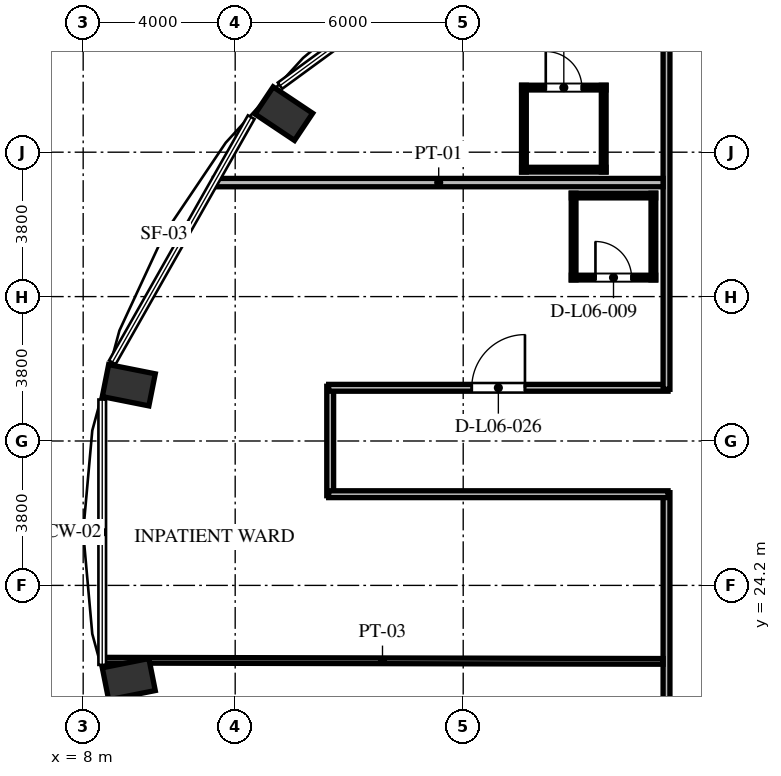
"""IFC4 building model, lengths in metres.
Left out: names, types, materials, properties, quantities, classifications, styles, units other than length and angle.
Written with IfcOpenShell. Run it as: python <this file> out.ifc"""

import sys

from ifc_helpers import new_model, si_unit, direction, frame, frame_2d, origin, origin_2d, place, context, subcontext, project, spatial, rectangle, extrude, element, fill, save


model = new_model("IFC4")
c1 = context("Model", 3, precision=1e-05, world=origin(), true_north=direction((0.0, 1.0)))
c2 = subcontext(c1, "Body", "Model", "MODEL_VIEW")
j1 = project(units=[si_unit("LENGTHUNIT", "METRE"), si_unit("PLANEANGLEUNIT", "RADIAN")], contexts=[c1])
p1 = place(None, origin())
s1 = spatial("IfcSite", under=j1, at=p1, CompositionType="ELEMENT")
p2 = place(p1, origin())
s2 = spatial("IfcBuilding", under=s1, at=p2, CompositionType="ELEMENT")
p3 = place(p2, frame((0.0, 0.0, 28.848)))
s3 = spatial("IfcBuildingStorey", under=s2, at=p3, CompositionType="ELEMENT", Elevation=28.848)
for number, where, z_axis, x_axis in (
    (1, (13.28, 36.614, 0.0), (0.0, 0.0, 1.0), (-0.831, 0.556, 0.0)),
    (2, (9.2, 29.468, 0.0), (0.0, 0.0, 1.0), (-0.981, 0.195, 0.0)),
    (3, (9.2, 21.732, 0.0), (0.0, 0.0, 1.0), (-0.981, -0.195, 0.0)),
):
    element("IfcColumn", number, at=place(p3, frame(where, z_axis=z_axis, x_axis=x_axis)), inside=s3, PredefinedType="COLUMN", context=c2, shape_type="SweptSolid", body=[
        extrude(rectangle(XDim=1.25, YDim=0.86, at=origin_2d()), origin(), (0.0, 0.0, 1.0), 3.648),
    ])
p4 = place(p3, frame((14.5, 26.56, 0.0), z_axis=(0.0, 0.0, 1.0), x_axis=(0.0, 1.0, 0.0)))
e4 = element("IfcWall", 4, at=p4, inside=s3, PredefinedType="PARTITIONING", context=c2, shape_type="SweptSolid", body=[
    extrude(rectangle(XDim=2.88, YDim=0.18, at=frame_2d((1.44, 0.0))), origin(), (0.0, 0.0, 1.0), 3.428),
])
p5 = place(p3, frame((14.46, 29.4, 0.0), z_axis=(0.0, 0.0, 1.0), x_axis=(1.0, 0.0, 0.0)))
e5 = element("IfcWall", 5, at=p5, inside=s3, PredefinedType="PARTITIONING", context=c2, shape_type="SweptSolid", body=[
    extrude(rectangle(XDim=8.93, YDim=0.18, at=frame_2d((4.465, 0.0))), origin(), (0.0, 0.0, 1.0), 3.428),
])
p6 = place(p5, frame((3.765, 0.0, 0.0)))
e6 = element("IfcOpeningElement", 6, at=p6, cuts=e5, PredefinedType="OPENING", context=c2, shape_type="SweptSolid", body=[
    extrude(rectangle(XDim=1.4, YDim=2.2, at=frame_2d((0.7, 1.1))), frame((0.0, 0.1, 0.0), z_axis=(0.0, -1.0, 0.0), x_axis=(1.0, 0.0, 0.0)), (0.0, 0.0, 1.0), 0.2),
])
p7 = place(p3, frame((23.35, 29.36, 0.0), z_axis=(0.0, 0.0, 1.0), x_axis=(0.0, 1.0, 0.0)))
e7 = element("IfcWall", 7, at=p7, inside=s3, PredefinedType="PARTITIONING", context=c2, shape_type="SweptSolid", body=[
    extrude(rectangle(XDim=9.43, YDim=0.18, at=frame_2d((4.715, 0.0))), origin(), (0.0, 0.0, 1.0), 3.428),
])
p8 = place(p3, frame((23.35, 17.36, 0.0), z_axis=(0.0, 0.0, 1.0), x_axis=(0.0, 1.0, 0.0)))
e8 = element("IfcWall", 8, at=p8, inside=s3, PredefinedType="PARTITIONING", context=c2, shape_type="SweptSolid", body=[
    extrude(rectangle(XDim=9.28, YDim=0.18, at=frame_2d((4.64, 0.0))), origin(), (0.0, 0.0, 1.0), 3.428),
])
p9 = place(p3, frame((23.39, 26.6, 0.0), z_axis=(0.0, 0.0, 1.0), x_axis=(-1.0, 0.0, 0.0)))
e9 = element("IfcWall", 9, at=p9, inside=s3, PredefinedType="PARTITIONING", context=c2, shape_type="SweptSolid", body=[
    extrude(rectangle(XDim=8.93, YDim=0.18, at=frame_2d((4.465, 0.0))), origin(), (0.0, 0.0, 1.0), 3.428),
])
p10 = place(p3, frame((8.493, 22.231, 0.0), z_axis=(0.0, 0.0, 1.0), x_axis=(0.999997760873, -0.002116187438, 0.0)))
e10 = element("IfcWall", 10, at=p10, inside=s3, PredefinedType="PARTITIONING", context=c2, shape_type="SweptSolid", body=[
    extrude(rectangle(XDim=14.767, YDim=0.15, at=frame_2d((7.384, 0.0))), origin(), (0.0, 0.0, 1.0), 3.428),
])
p11 = place(p3, frame((11.451, 34.8, 0.0), z_axis=(0.0, 0.0, 1.0), x_axis=(1.0, 0.0, 0.0)))
e11 = element("IfcWall", 11, at=p11, inside=s3, PredefinedType="PARTITIONING", context=c2, shape_type="SweptSolid", body=[
    extrude(rectangle(XDim=11.809, YDim=0.22, at=frame_2d((5.905, 0.0))), origin(), (0.0, 0.0, 1.0), 3.428),
])
p12 = place(p3, frame((19.538, 37.3, 0.0), z_axis=(0.0, 0.0, 1.0), x_axis=(1.0, 0.0, 0.0)))
e12 = element("IfcWall", 12, at=p12, inside=s3, PredefinedType="PARTITIONING", context=c2, shape_type="SweptSolid", body=[
    extrude(rectangle(XDim=2.22, YDim=0.125, at=frame_2d((1.11, 0.0))), origin(), (0.0, 0.0, 1.0), 3.428),
])
p13 = place(p12, frame((0.635, 0.0, 0.0)))
e13 = element("IfcOpeningElement", 13, at=p13, cuts=e12, PredefinedType="OPENING", context=c2, shape_type="SweptSolid", body=[
    extrude(rectangle(XDim=0.95, YDim=2.1, at=frame_2d((0.475, 1.05))), frame((0.0, 0.073, 0.0), z_axis=(0.0, -1.0, 0.0), x_axis=(1.0, 0.0, 0.0)), (0.0, 0.0, 1.0), 0.145),
])
p14 = place(p3, frame((19.538, 35.14, 0.0), z_axis=(0.0, 0.0, 1.0), x_axis=(1.0, 0.0, 0.0)))
e14 = element("IfcWall", 14, at=p14, inside=s3, PredefinedType="PARTITIONING", context=c2, shape_type="SweptSolid", body=[
    extrude(rectangle(XDim=2.22, YDim=0.125, at=frame_2d((1.11, 0.0))), origin(), (0.0, 0.0, 1.0), 3.428),
])
for number, where, z_axis, x_axis in (
    (15, (21.698, 35.08, 0.0), (0.0, 0.0, 1.0), (0.0, 1.0, 0.0)),
    (16, (19.597, 35.08, 0.0), (0.0, 0.0, 1.0), (0.0, 1.0, 0.0)),
):
    element("IfcWall", number, at=place(p3, frame(where, z_axis=z_axis, x_axis=x_axis)), inside=s3, PredefinedType="PARTITIONING", context=c2, shape_type="SweptSolid", body=[
        extrude(rectangle(XDim=2.28, YDim=0.125, at=frame_2d((1.14, 0.0))), origin(), (0.0, 0.0, 1.0), 3.428),
    ])
p15 = place(p3, frame((20.845, 34.46, 0.0), z_axis=(0.0, 0.0, 1.0), x_axis=(1.0, 0.0, 0.0)))
e17 = element("IfcWall", 17, at=p15, inside=s3, PredefinedType="PARTITIONING", context=c2, shape_type="SweptSolid", body=[
    extrude(rectangle(XDim=2.22, YDim=0.125, at=frame_2d((1.11, 0.0))), origin(), (0.0, 0.0, 1.0), 3.428),
])
p16 = place(p3, frame((20.845, 32.3, 0.0), z_axis=(0.0, 0.0, 1.0), x_axis=(1.0, 0.0, 0.0)))
e18 = element("IfcWall", 18, at=p16, inside=s3, PredefinedType="PARTITIONING", context=c2, shape_type="SweptSolid", body=[
    extrude(rectangle(XDim=2.22, YDim=0.125, at=frame_2d((1.11, 0.0))), origin(), (0.0, 0.0, 1.0), 3.428),
])
p17 = place(p16, frame((0.635, 0.0, 0.0)))
e19 = element("IfcOpeningElement", 19, at=p17, cuts=e18, PredefinedType="OPENING", context=c2, shape_type="SweptSolid", body=[
    extrude(rectangle(XDim=0.95, YDim=2.1, at=frame_2d((0.475, 1.05))), frame((0.0, 0.073, 0.0), z_axis=(0.0, -1.0, 0.0), x_axis=(1.0, 0.0, 0.0)), (0.0, 0.0, 1.0), 0.145),
])
for number, where, z_axis, x_axis in (
    (20, (23.005, 32.24, 0.0), (0.0, 0.0, 1.0), (0.0, 1.0, 0.0)),
    (21, (20.905, 32.24, 0.0), (0.0, 0.0, 1.0), (0.0, 1.0, 0.0)),
):
    element("IfcWall", number, at=place(p3, frame(where, z_axis=z_axis, x_axis=x_axis)), inside=s3, PredefinedType="PARTITIONING", context=c2, shape_type="SweptSolid", body=[
        extrude(rectangle(XDim=2.28, YDim=0.125, at=frame_2d((1.14, 0.0))), origin(), (0.0, 0.0, 1.0), 3.428),
    ])
p18 = place(p13, origin())
e22 = element("IfcDoor", 22, at=p18, inside=s3, OperationType="SINGLE_SWING_LEFT", PredefinedType="DOOR", context=c2, shape_type="SweptSolid", body=[
    extrude(rectangle(XDim=0.95, YDim=2.1, at=frame_2d((0.475, 1.05))), frame((0.0, 0.025, 0.0), z_axis=(0.0, -1.0, 0.0), x_axis=(1.0, 0.0, 0.0)), (0.0, 0.0, 1.0), 0.05),
])
fill(e13, e22)
p19 = place(p17, origin())
e23 = element("IfcDoor", 23, at=p19, inside=s3, OperationType="SINGLE_SWING_LEFT", PredefinedType="DOOR", context=c2, shape_type="SweptSolid", body=[
    extrude(rectangle(XDim=0.95, YDim=2.1, at=frame_2d((0.475, 1.05))), frame((0.0, 0.025, 0.0), z_axis=(0.0, -1.0, 0.0), x_axis=(1.0, 0.0, 0.0)), (0.0, 0.0, 1.0), 0.05),
])
fill(e19, e23)
p20 = place(p6, origin())
e24 = element("IfcDoor", 24, at=p20, inside=s3, OperationType="SINGLE_SWING_RIGHT", PredefinedType="DOOR", context=c2, shape_type="SweptSolid", body=[
    extrude(rectangle(XDim=1.4, YDim=2.2, at=frame_2d((0.7, 1.1))), frame((0.0, 0.025, 0.0), z_axis=(0.0, -1.0, 0.0), x_axis=(1.0, 0.0, 0.0)), (0.0, 0.0, 1.0), 0.05),
])
fill(e6, e24)
save(model, sys.argv[1])
